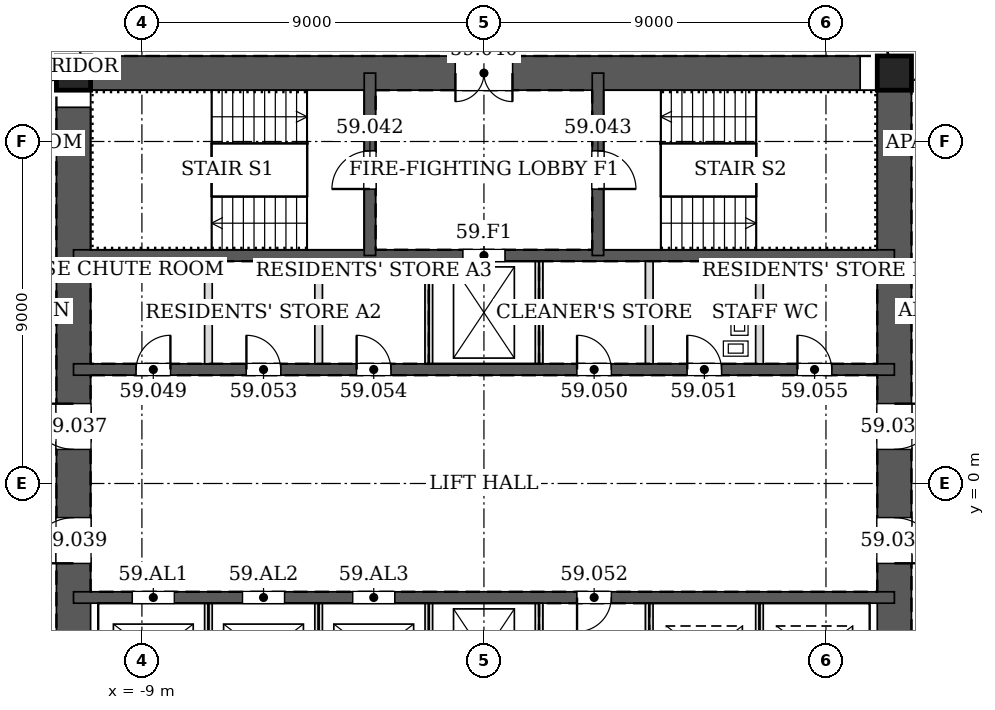
"""IFC4 building model, lengths in metres.
Left out: names, types, materials, properties, quantities, classifications, styles, units other than length and angle.
Written with IfcOpenShell. Run it as: python <this file> out.ifc"""

import sys

from ifc_helpers import new_model, si_unit, direction, frame, frame_2d, origin, origin_2d, place, context, subcontext, project, spatial, rectangle, hollow_rectangle, extrude, element, fill, save


model = new_model("IFC4")
c1 = context("Model", 3, precision=1e-05, world=origin(), true_north=direction((0.0, 1.0)))
c2 = subcontext(c1, "Body", "Model", "MODEL_VIEW")
j1 = project(units=[si_unit("LENGTHUNIT", "METRE"), si_unit("PLANEANGLEUNIT", "RADIAN")], contexts=[c1])
p1 = place(None, origin())
s1 = spatial("IfcSite", under=j1, at=p1, CompositionType="ELEMENT")
p2 = place(p1, origin())
s2 = spatial("IfcBuilding", under=s1, at=p2, CompositionType="ELEMENT")
p3 = place(p2, frame((0.0, 0.0, 248.2)))
s3 = spatial("IfcBuildingStorey", under=s2, at=p3, CompositionType="ELEMENT", Elevation=248.2)
for number, where, z_axis, x_axis in (
    (1, (10.8, 10.8, 0.0), (0.0, 0.0, 1.0), (1.0, 0.0, 0.0)),
    (2, (-10.8, 10.8, 0.0), (0.0, 0.0, 1.0), (1.0, 0.0, 0.0)),
):
    element("IfcColumn", number, at=place(p3, frame(where, z_axis=z_axis, x_axis=x_axis)), inside=s3, PredefinedType="COLUMN", context=c2, shape_type="SweptSolid", body=[
        extrude(hollow_rectangle(XDim=0.9, YDim=0.9, WallThickness=0.04, at=origin_2d()), origin(), (0.0, 0.0, 1.0), 3.4),
    ])
p4 = place(p3, frame((10.8, -10.8, 0.0), z_axis=(0.0, 0.0, 1.0), x_axis=(0.0, 1.0, 0.0)))
e3 = element("IfcWall", 3, at=p4, inside=s3, PredefinedType="SOLIDWALL", context=c2, shape_type="SweptSolid", body=[
    extrude(rectangle(XDim=21.6, YDim=0.9, at=frame_2d((10.8, 0.0))), origin(), (0.0, 0.0, 1.0), 3.4),
])
p5 = place(p4, frame((11.7, 0.0, 0.0)))
e4 = element("IfcOpeningElement", 4, at=p5, cuts=e3, PredefinedType="OPENING", context=c2, shape_type="SweptSolid", body=[
    extrude(rectangle(XDim=1.2, YDim=2.1, at=frame_2d((0.6, 1.05))), frame((0.0, 0.46, 0.0), z_axis=(0.0, -1.0, 0.0), x_axis=(1.0, 0.0, 0.0)), (0.0, 0.0, 1.0), 0.92),
])
p6 = place(p4, frame((8.7, 0.0, 0.0)))
e5 = element("IfcOpeningElement", 5, at=p6, cuts=e3, PredefinedType="OPENING", context=c2, shape_type="SweptSolid", body=[
    extrude(rectangle(XDim=1.2, YDim=2.1, at=frame_2d((0.6, 1.05))), frame((0.0, 0.46, 0.0), z_axis=(0.0, -1.0, 0.0), x_axis=(1.0, 0.0, 0.0)), (0.0, 0.0, 1.0), 0.92),
])
p7 = place(p3, frame((10.8, 10.8, 0.0), z_axis=(0.0, 0.0, 1.0), x_axis=(-1.0, 0.0, 0.0)))
e6 = element("IfcWall", 6, at=p7, inside=s3, PredefinedType="SOLIDWALL", context=c2, shape_type="SweptSolid", body=[
    extrude(rectangle(XDim=21.6, YDim=0.9, at=frame_2d((10.8, 0.0))), origin(), (0.0, 0.0, 1.0), 3.4),
])
p8 = place(p7, frame((10.05, 0.0, 0.0)))
e7 = element("IfcOpeningElement", 7, at=p8, cuts=e6, PredefinedType="OPENING", context=c2, shape_type="SweptSolid", body=[
    extrude(rectangle(XDim=1.5, YDim=2.1, at=frame_2d((0.75, 1.05))), frame((0.0, 0.46, 0.0), z_axis=(0.0, -1.0, 0.0), x_axis=(1.0, 0.0, 0.0)), (0.0, 0.0, 1.0), 0.92),
])
p9 = place(p3, frame((-10.8, 10.8, 0.0), z_axis=(0.0, 0.0, 1.0), x_axis=(0.0, -1.0, 0.0)))
e8 = element("IfcWall", 8, at=p9, inside=s3, PredefinedType="SOLIDWALL", context=c2, shape_type="SweptSolid", body=[
    extrude(rectangle(XDim=21.6, YDim=0.9, at=frame_2d((10.8, 0.0))), origin(), (0.0, 0.0, 1.0), 3.4),
])
p10 = place(p9, frame((8.7, 0.0, 0.0)))
e9 = element("IfcOpeningElement", 9, at=p10, cuts=e8, PredefinedType="OPENING", context=c2, shape_type="SweptSolid", body=[
    extrude(rectangle(XDim=1.2, YDim=2.1, at=frame_2d((0.6, 1.05))), frame((0.0, 0.46, 0.0), z_axis=(0.0, -1.0, 0.0), x_axis=(1.0, 0.0, 0.0)), (0.0, 0.0, 1.0), 0.92),
])
p11 = place(p9, frame((11.7, 0.0, 0.0)))
e10 = element("IfcOpeningElement", 10, at=p11, cuts=e8, PredefinedType="OPENING", context=c2, shape_type="SweptSolid", body=[
    extrude(rectangle(XDim=1.2, YDim=2.1, at=frame_2d((0.6, 1.05))), frame((0.0, 0.46, 0.0), z_axis=(0.0, -1.0, 0.0), x_axis=(1.0, 0.0, 0.0)), (0.0, 0.0, 1.0), 0.92),
])
p12 = place(p3, frame((-10.8, 3.0, 0.0), z_axis=(0.0, 0.0, 1.0), x_axis=(1.0, 0.0, 0.0)))
e11 = element("IfcWall", 11, at=p12, inside=s3, PredefinedType="SOLIDWALL", context=c2, shape_type="SweptSolid", body=[
    extrude(rectangle(XDim=21.6, YDim=0.3, at=frame_2d((10.8, 0.0))), origin(), (0.0, 0.0, 1.0), 3.4),
])
p13 = place(p12, frame((1.65, 0.0, 0.0)))
e12 = element("IfcOpeningElement", 12, at=p13, cuts=e11, PredefinedType="OPENING", context=c2, shape_type="SweptSolid", body=[
    extrude(rectangle(XDim=0.9, YDim=2.1, at=frame_2d((0.45, 1.05))), frame((0.0, 0.16, 0.0), z_axis=(0.0, -1.0, 0.0), x_axis=(1.0, 0.0, 0.0)), (0.0, 0.0, 1.0), 0.32),
])
p14 = place(p12, frame((13.25, 0.0, 0.0)))
e13 = element("IfcOpeningElement", 13, at=p14, cuts=e11, PredefinedType="OPENING", context=c2, shape_type="SweptSolid", body=[
    extrude(rectangle(XDim=0.9, YDim=2.1, at=frame_2d((0.45, 1.05))), frame((0.0, 0.16, 0.0), z_axis=(0.0, -1.0, 0.0), x_axis=(1.0, 0.0, 0.0)), (0.0, 0.0, 1.0), 0.32),
])
p15 = place(p12, frame((16.15, 0.0, 0.0)))
e14 = element("IfcOpeningElement", 14, at=p15, cuts=e11, PredefinedType="OPENING", context=c2, shape_type="SweptSolid", body=[
    extrude(rectangle(XDim=0.9, YDim=2.1, at=frame_2d((0.45, 1.05))), frame((0.0, 0.16, 0.0), z_axis=(0.0, -1.0, 0.0), x_axis=(1.0, 0.0, 0.0)), (0.0, 0.0, 1.0), 0.32),
])
p16 = place(p12, frame((4.55, 0.0, 0.0)))
e15 = element("IfcOpeningElement", 15, at=p16, cuts=e11, PredefinedType="OPENING", context=c2, shape_type="SweptSolid", body=[
    extrude(rectangle(XDim=0.9, YDim=2.1, at=frame_2d((0.45, 1.05))), frame((0.0, 0.16, 0.0), z_axis=(0.0, -1.0, 0.0), x_axis=(1.0, 0.0, 0.0)), (0.0, 0.0, 1.0), 0.32),
])
p17 = place(p12, frame((7.45, 0.0, 0.0)))
e16 = element("IfcOpeningElement", 16, at=p17, cuts=e11, PredefinedType="OPENING", context=c2, shape_type="SweptSolid", body=[
    extrude(rectangle(XDim=0.9, YDim=2.1, at=frame_2d((0.45, 1.05))), frame((0.0, 0.16, 0.0), z_axis=(0.0, -1.0, 0.0), x_axis=(1.0, 0.0, 0.0)), (0.0, 0.0, 1.0), 0.32),
])
p18 = place(p12, frame((19.05, 0.0, 0.0)))
e17 = element("IfcOpeningElement", 17, at=p18, cuts=e11, PredefinedType="OPENING", context=c2, shape_type="SweptSolid", body=[
    extrude(rectangle(XDim=0.9, YDim=2.1, at=frame_2d((0.45, 1.05))), frame((0.0, 0.16, 0.0), z_axis=(0.0, -1.0, 0.0), x_axis=(1.0, 0.0, 0.0)), (0.0, 0.0, 1.0), 0.32),
])
p19 = place(p3, frame((-10.8, 6.0, 0.0), z_axis=(0.0, 0.0, 1.0), x_axis=(1.0, 0.0, 0.0)))
e18 = element("IfcWall", 18, at=p19, inside=s3, PredefinedType="SOLIDWALL", context=c2, shape_type="SweptSolid", body=[
    extrude(rectangle(XDim=21.6, YDim=0.3, at=frame_2d((10.8, 0.0))), origin(), (0.0, 0.0, 1.0), 3.4),
])
p20 = place(p19, frame((10.25, 0.0, 0.0)))
e19 = element("IfcOpeningElement", 19, at=p20, cuts=e18, PredefinedType="OPENING", context=c2, shape_type="SweptSolid", body=[
    extrude(rectangle(XDim=1.1, YDim=2.1, at=frame_2d((0.55, 1.05))), frame((0.0, 0.16, 0.0), z_axis=(0.0, -1.0, 0.0), x_axis=(1.0, 0.0, 0.0)), (0.0, 0.0, 1.0), 0.32),
])
p21 = place(p3, frame((-3.0, 6.0, 0.0), z_axis=(0.0, 0.0, 1.0), x_axis=(0.0, 1.0, 0.0)))
e20 = element("IfcWall", 20, at=p21, inside=s3, PredefinedType="SOLIDWALL", context=c2, shape_type="SweptSolid", body=[
    extrude(rectangle(XDim=4.8, YDim=0.3, at=frame_2d((2.4, 0.0))), origin(), (0.0, 0.0, 1.0), 3.4),
])
p22 = place(p21, frame((1.75, 0.0, 0.0)))
e21 = element("IfcOpeningElement", 21, at=p22, cuts=e20, PredefinedType="OPENING", context=c2, shape_type="SweptSolid", body=[
    extrude(rectangle(XDim=1.0, YDim=2.1, at=frame_2d((0.5, 1.05))), frame((0.0, 0.16, 0.0), z_axis=(0.0, -1.0, 0.0), x_axis=(1.0, 0.0, 0.0)), (0.0, 0.0, 1.0), 0.32),
])
p23 = place(p3, frame((3.0, 6.0, 0.0), z_axis=(0.0, 0.0, 1.0), x_axis=(0.0, 1.0, 0.0)))
e22 = element("IfcWall", 22, at=p23, inside=s3, PredefinedType="SOLIDWALL", context=c2, shape_type="SweptSolid", body=[
    extrude(rectangle(XDim=4.8, YDim=0.3, at=frame_2d((2.4, 0.0))), origin(), (0.0, 0.0, 1.0), 3.4),
])
p24 = place(p23, frame((1.75, 0.0, 0.0)))
e23 = element("IfcOpeningElement", 23, at=p24, cuts=e22, PredefinedType="OPENING", context=c2, shape_type="SweptSolid", body=[
    extrude(rectangle(XDim=1.0, YDim=2.1, at=frame_2d((0.5, 1.05))), frame((0.0, 0.16, 0.0), z_axis=(0.0, -1.0, 0.0), x_axis=(1.0, 0.0, 0.0)), (0.0, 0.0, 1.0), 0.32),
])
p25 = place(p3, frame((-10.8, -3.0, 0.0), z_axis=(0.0, 0.0, 1.0), x_axis=(1.0, 0.0, 0.0)))
e24 = element("IfcWall", 24, at=p25, inside=s3, PredefinedType="SOLIDWALL", context=c2, shape_type="SweptSolid", body=[
    extrude(rectangle(XDim=21.6, YDim=0.3, at=frame_2d((10.8, 0.0))), origin(), (0.0, 0.0, 1.0), 3.4),
])
p26 = place(p25, frame((13.25, 0.0, 0.0)))
e25 = element("IfcOpeningElement", 25, at=p26, cuts=e24, PredefinedType="OPENING", context=c2, shape_type="SweptSolid", body=[
    extrude(rectangle(XDim=0.9, YDim=2.1, at=frame_2d((0.45, 1.05))), frame((0.0, 0.16, 0.0), z_axis=(0.0, -1.0, 0.0), x_axis=(1.0, 0.0, 0.0)), (0.0, 0.0, 1.0), 0.32),
])
p27 = place(p25, frame((1.55, 0.0, 0.0)))
e26 = element("IfcOpeningElement", 26, at=p27, cuts=e24, PredefinedType="OPENING", context=c2, shape_type="SweptSolid", body=[
    extrude(rectangle(XDim=1.1, YDim=2.1, at=frame_2d((0.55, 1.05))), frame((0.0, 0.16, 0.0), z_axis=(0.0, -1.0, 0.0), x_axis=(1.0, 0.0, 0.0)), (0.0, 0.0, 1.0), 0.32),
])
p28 = place(p25, frame((4.45, 0.0, 0.0)))
e27 = element("IfcOpeningElement", 27, at=p28, cuts=e24, PredefinedType="OPENING", context=c2, shape_type="SweptSolid", body=[
    extrude(rectangle(XDim=1.1, YDim=2.1, at=frame_2d((0.55, 1.05))), frame((0.0, 0.16, 0.0), z_axis=(0.0, -1.0, 0.0), x_axis=(1.0, 0.0, 0.0)), (0.0, 0.0, 1.0), 0.32),
])
p29 = place(p25, frame((7.35, 0.0, 0.0)))
e28 = element("IfcOpeningElement", 28, at=p29, cuts=e24, PredefinedType="OPENING", context=c2, shape_type="SweptSolid", body=[
    extrude(rectangle(XDim=1.1, YDim=2.1, at=frame_2d((0.55, 1.05))), frame((0.0, 0.16, 0.0), z_axis=(0.0, -1.0, 0.0), x_axis=(1.0, 0.0, 0.0)), (0.0, 0.0, 1.0), 0.32),
])
for number, where, z_axis, x_axis in (
    (29, (-7.25, 3.15, 0.0), (0.0, 0.0, 1.0), (0.0, 1.0, 0.0)),
    (30, (-4.35, 3.15, 0.0), (0.0, 0.0, 1.0), (0.0, 1.0, 0.0)),
    (31, (-1.45, 3.15, 0.0), (0.0, 0.0, 1.0), (0.0, 1.0, 0.0)),
    (32, (1.45, 3.15, 0.0), (0.0, 0.0, 1.0), (0.0, 1.0, 0.0)),
    (33, (4.35, 3.15, 0.0), (0.0, 0.0, 1.0), (0.0, 1.0, 0.0)),
    (34, (7.25, 3.15, 0.0), (0.0, 0.0, 1.0), (0.0, 1.0, 0.0)),
):
    element("IfcWall", number, at=place(p3, frame(where, z_axis=z_axis, x_axis=x_axis)), inside=s3, PredefinedType="PARTITIONING", context=c2, shape_type="SweptSolid", body=[
        extrude(rectangle(XDim=2.7, YDim=0.2, at=frame_2d((1.35, 0.0))), origin(), (0.0, 0.0, 1.0), 3.2),
    ])
for number, where, z_axis, x_axis in (
    (35, (-7.25, -5.85, 0.0), (0.0, 0.0, 1.0), (0.0, 1.0, 0.0)),
    (36, (-4.35, -5.85, 0.0), (0.0, 0.0, 1.0), (0.0, 1.0, 0.0)),
    (37, (-1.45, -5.85, 0.0), (0.0, 0.0, 1.0), (0.0, 1.0, 0.0)),
):
    element("IfcWall", number, at=place(p3, frame(where, z_axis=z_axis, x_axis=x_axis)), inside=s3, PredefinedType="PARTITIONING", context=c2, shape_type="SweptSolid", body=[
        extrude(rectangle(XDim=2.7, YDim=0.2, at=frame_2d((1.35, 0.0))), origin(), (0.0, 0.0, 1.0), 3.4),
    ])
for number, where, z_axis, x_axis in (
    (38, (1.45, -5.85, 0.0), (0.0, 0.0, 1.0), (0.0, 1.0, 0.0)),
    (39, (4.35, -5.85, 0.0), (0.0, 0.0, 1.0), (0.0, 1.0, 0.0)),
):
    element("IfcWall", number, at=place(p3, frame(where, z_axis=z_axis, x_axis=x_axis)), inside=s3, PredefinedType="PARTITIONING", context=c2, shape_type="SweptSolid", body=[
        extrude(rectangle(XDim=2.7, YDim=0.2, at=frame_2d((1.35, 0.0))), origin(), (0.0, 0.0, 1.0), 3.2),
    ])
p30 = place(p3, frame((7.25, -5.85, 0.0), z_axis=(0.0, 0.0, 1.0), x_axis=(0.0, 1.0, 0.0)))
e40 = element("IfcWall", 40, at=p30, inside=s3, PredefinedType="PARTITIONING", context=c2, shape_type="SweptSolid", body=[
    extrude(rectangle(XDim=2.7, YDim=0.2, at=frame_2d((1.35, 0.0))), origin(), (0.0, 0.0, 1.0), 3.4),
])
p31 = place(p5, frame((1.2, 0.0, 0.0), z_axis=(0.0, 0.0, 1.0), x_axis=(-1.0, 0.0, 0.0)))
e41 = element("IfcDoor", 41, at=p31, inside=s3, OperationType="SINGLE_SWING_LEFT", PredefinedType="DOOR", context=c2, shape_type="SweptSolid", body=[
    extrude(rectangle(XDim=1.2, YDim=2.1, at=frame_2d((0.6, 1.05))), frame((0.0, 0.025, 0.0), z_axis=(0.0, -1.0, 0.0), x_axis=(1.0, 0.0, 0.0)), (0.0, 0.0, 1.0), 0.05),
])
fill(e4, e41)
p32 = place(p10, frame((1.2, 0.0, 0.0), z_axis=(0.0, 0.0, 1.0), x_axis=(-1.0, 0.0, 0.0)))
e42 = element("IfcDoor", 42, at=p32, inside=s3, OperationType="SINGLE_SWING_RIGHT", PredefinedType="DOOR", context=c2, shape_type="SweptSolid", body=[
    extrude(rectangle(XDim=1.2, YDim=2.1, at=frame_2d((0.6, 1.05))), frame((0.0, 0.025, 0.0), z_axis=(0.0, -1.0, 0.0), x_axis=(1.0, 0.0, 0.0)), (0.0, 0.0, 1.0), 0.05),
])
fill(e9, e42)
p33 = place(p6, frame((1.2, 0.0, 0.0), z_axis=(0.0, 0.0, 1.0), x_axis=(-1.0, 0.0, 0.0)))
e43 = element("IfcDoor", 43, at=p33, inside=s3, OperationType="SINGLE_SWING_RIGHT", PredefinedType="DOOR", context=c2, shape_type="SweptSolid", body=[
    extrude(rectangle(XDim=1.2, YDim=2.1, at=frame_2d((0.6, 1.05))), frame((0.0, 0.025, 0.0), z_axis=(0.0, -1.0, 0.0), x_axis=(1.0, 0.0, 0.0)), (0.0, 0.0, 1.0), 0.05),
])
fill(e5, e43)
p34 = place(p11, frame((1.2, 0.0, 0.0), z_axis=(0.0, 0.0, 1.0), x_axis=(-1.0, 0.0, 0.0)))
e44 = element("IfcDoor", 44, at=p34, inside=s3, OperationType="SINGLE_SWING_LEFT", PredefinedType="DOOR", context=c2, shape_type="SweptSolid", body=[
    extrude(rectangle(XDim=1.2, YDim=2.1, at=frame_2d((0.6, 1.05))), frame((0.0, 0.025, 0.0), z_axis=(0.0, -1.0, 0.0), x_axis=(1.0, 0.0, 0.0)), (0.0, 0.0, 1.0), 0.05),
])
fill(e10, e44)
p35 = place(p8, origin())
e45 = element("IfcDoor", 45, at=p35, inside=s3, OperationType="DOUBLE_DOOR_SINGLE_SWING", PredefinedType="DOOR", context=c2, shape_type="SweptSolid", body=[
    extrude(rectangle(XDim=1.5, YDim=2.1, at=frame_2d((0.75, 1.05))), frame((0.0, 0.025, 0.0), z_axis=(0.0, -1.0, 0.0), x_axis=(1.0, 0.0, 0.0)), (0.0, 0.0, 1.0), 0.05),
])
fill(e7, e45)
p36 = place(p22, origin())
e46 = element("IfcDoor", 46, at=p36, inside=s3, OperationType="SINGLE_SWING_LEFT", PredefinedType="DOOR", context=c2, shape_type="SweptSolid", body=[
    extrude(rectangle(XDim=1.0, YDim=2.1, at=frame_2d((0.5, 1.05))), frame((0.0, 0.025, 0.0), z_axis=(0.0, -1.0, 0.0), x_axis=(1.0, 0.0, 0.0)), (0.0, 0.0, 1.0), 0.05),
])
fill(e21, e46)
p37 = place(p24, frame((1.0, 0.0, 0.0), z_axis=(0.0, 0.0, 1.0), x_axis=(-1.0, 0.0, 0.0)))
e47 = element("IfcDoor", 47, at=p37, inside=s3, OperationType="SINGLE_SWING_RIGHT", PredefinedType="DOOR", context=c2, shape_type="SweptSolid", body=[
    extrude(rectangle(XDim=1.0, YDim=2.1, at=frame_2d((0.5, 1.05))), frame((0.0, 0.025, 0.0), z_axis=(0.0, -1.0, 0.0), x_axis=(1.0, 0.0, 0.0)), (0.0, 0.0, 1.0), 0.05),
])
fill(e23, e47)
p38 = place(p13, origin())
e48 = element("IfcDoor", 48, at=p38, inside=s3, OperationType="SINGLE_SWING_RIGHT", PredefinedType="DOOR", context=c2, shape_type="SweptSolid", body=[
    extrude(rectangle(XDim=0.9, YDim=2.1, at=frame_2d((0.45, 1.05))), frame((0.0, 0.025, 0.0), z_axis=(0.0, -1.0, 0.0), x_axis=(1.0, 0.0, 0.0)), (0.0, 0.0, 1.0), 0.05),
])
fill(e12, e48)
p39 = place(p14, origin())
e49 = element("IfcDoor", 49, at=p39, inside=s3, OperationType="SINGLE_SWING_LEFT", PredefinedType="DOOR", context=c2, shape_type="SweptSolid", body=[
    extrude(rectangle(XDim=0.9, YDim=2.1, at=frame_2d((0.45, 1.05))), frame((0.0, 0.025, 0.0), z_axis=(0.0, -1.0, 0.0), x_axis=(1.0, 0.0, 0.0)), (0.0, 0.0, 1.0), 0.05),
])
fill(e13, e49)
p40 = place(p15, origin())
e50 = element("IfcDoor", 50, at=p40, inside=s3, OperationType="SINGLE_SWING_LEFT", PredefinedType="DOOR", context=c2, shape_type="SweptSolid", body=[
    extrude(rectangle(XDim=0.9, YDim=2.1, at=frame_2d((0.45, 1.05))), frame((0.0, 0.025, 0.0), z_axis=(0.0, -1.0, 0.0), x_axis=(1.0, 0.0, 0.0)), (0.0, 0.0, 1.0), 0.05),
])
fill(e14, e50)
p41 = place(p26, frame((0.9, 0.0, 0.0), z_axis=(0.0, 0.0, 1.0), x_axis=(-1.0, 0.0, 0.0)))
e51 = element("IfcDoor", 51, at=p41, inside=s3, OperationType="SINGLE_SWING_RIGHT", PredefinedType="DOOR", context=c2, shape_type="SweptSolid", body=[
    extrude(rectangle(XDim=0.9, YDim=2.1, at=frame_2d((0.45, 1.05))), frame((0.0, 0.025, 0.0), z_axis=(0.0, -1.0, 0.0), x_axis=(1.0, 0.0, 0.0)), (0.0, 0.0, 1.0), 0.05),
])
fill(e25, e51)
p42 = place(p16, origin())
e52 = element("IfcDoor", 52, at=p42, inside=s3, OperationType="SINGLE_SWING_LEFT", PredefinedType="DOOR", context=c2, shape_type="SweptSolid", body=[
    extrude(rectangle(XDim=0.9, YDim=2.1, at=frame_2d((0.45, 1.05))), frame((0.0, 0.025, 0.0), z_axis=(0.0, -1.0, 0.0), x_axis=(1.0, 0.0, 0.0)), (0.0, 0.0, 1.0), 0.05),
])
fill(e15, e52)
p43 = place(p17, origin())
e53 = element("IfcDoor", 53, at=p43, inside=s3, OperationType="SINGLE_SWING_LEFT", PredefinedType="DOOR", context=c2, shape_type="SweptSolid", body=[
    extrude(rectangle(XDim=0.9, YDim=2.1, at=frame_2d((0.45, 1.05))), frame((0.0, 0.025, 0.0), z_axis=(0.0, -1.0, 0.0), x_axis=(1.0, 0.0, 0.0)), (0.0, 0.0, 1.0), 0.05),
])
fill(e16, e53)
p44 = place(p18, origin())
e54 = element("IfcDoor", 54, at=p44, inside=s3, OperationType="SINGLE_SWING_LEFT", PredefinedType="DOOR", context=c2, shape_type="SweptSolid", body=[
    extrude(rectangle(XDim=0.9, YDim=2.1, at=frame_2d((0.45, 1.05))), frame((0.0, 0.025, 0.0), z_axis=(0.0, -1.0, 0.0), x_axis=(1.0, 0.0, 0.0)), (0.0, 0.0, 1.0), 0.05),
])
fill(e17, e54)
p45 = place(p20, origin())
e55 = element("IfcDoor", 55, at=p45, inside=s3, OperationType="DOUBLE_DOOR_SLIDING", PredefinedType="DOOR", context=c2, shape_type="SweptSolid", body=[
    extrude(rectangle(XDim=1.1, YDim=2.1, at=frame_2d((0.55, 1.05))), frame((0.0, 0.025, 0.0), z_axis=(0.0, -1.0, 0.0), x_axis=(1.0, 0.0, 0.0)), (0.0, 0.0, 1.0), 0.05),
])
fill(e19, e55)
p46 = place(p27, origin())
e56 = element("IfcDoor", 56, at=p46, inside=s3, OperationType="DOUBLE_DOOR_SLIDING", PredefinedType="DOOR", context=c2, shape_type="SweptSolid", body=[
    extrude(rectangle(XDim=1.1, YDim=2.1, at=frame_2d((0.55, 1.05))), frame((0.0, 0.025, 0.0), z_axis=(0.0, -1.0, 0.0), x_axis=(1.0, 0.0, 0.0)), (0.0, 0.0, 1.0), 0.05),
])
fill(e26, e56)
p47 = place(p28, origin())
e57 = element("IfcDoor", 57, at=p47, inside=s3, OperationType="DOUBLE_DOOR_SLIDING", PredefinedType="DOOR", context=c2, shape_type="SweptSolid", body=[
    extrude(rectangle(XDim=1.1, YDim=2.1, at=frame_2d((0.55, 1.05))), frame((0.0, 0.025, 0.0), z_axis=(0.0, -1.0, 0.0), x_axis=(1.0, 0.0, 0.0)), (0.0, 0.0, 1.0), 0.05),
])
fill(e27, e57)
p48 = place(p29, origin())
e58 = element("IfcDoor", 58, at=p48, inside=s3, OperationType="DOUBLE_DOOR_SLIDING", PredefinedType="DOOR", context=c2, shape_type="SweptSolid", body=[
    extrude(rectangle(XDim=1.1, YDim=2.1, at=frame_2d((0.55, 1.05))), frame((0.0, 0.025, 0.0), z_axis=(0.0, -1.0, 0.0), x_axis=(1.0, 0.0, 0.0)), (0.0, 0.0, 1.0), 0.05),
])
fill(e28, e58)
save(model, sys.argv[1])
